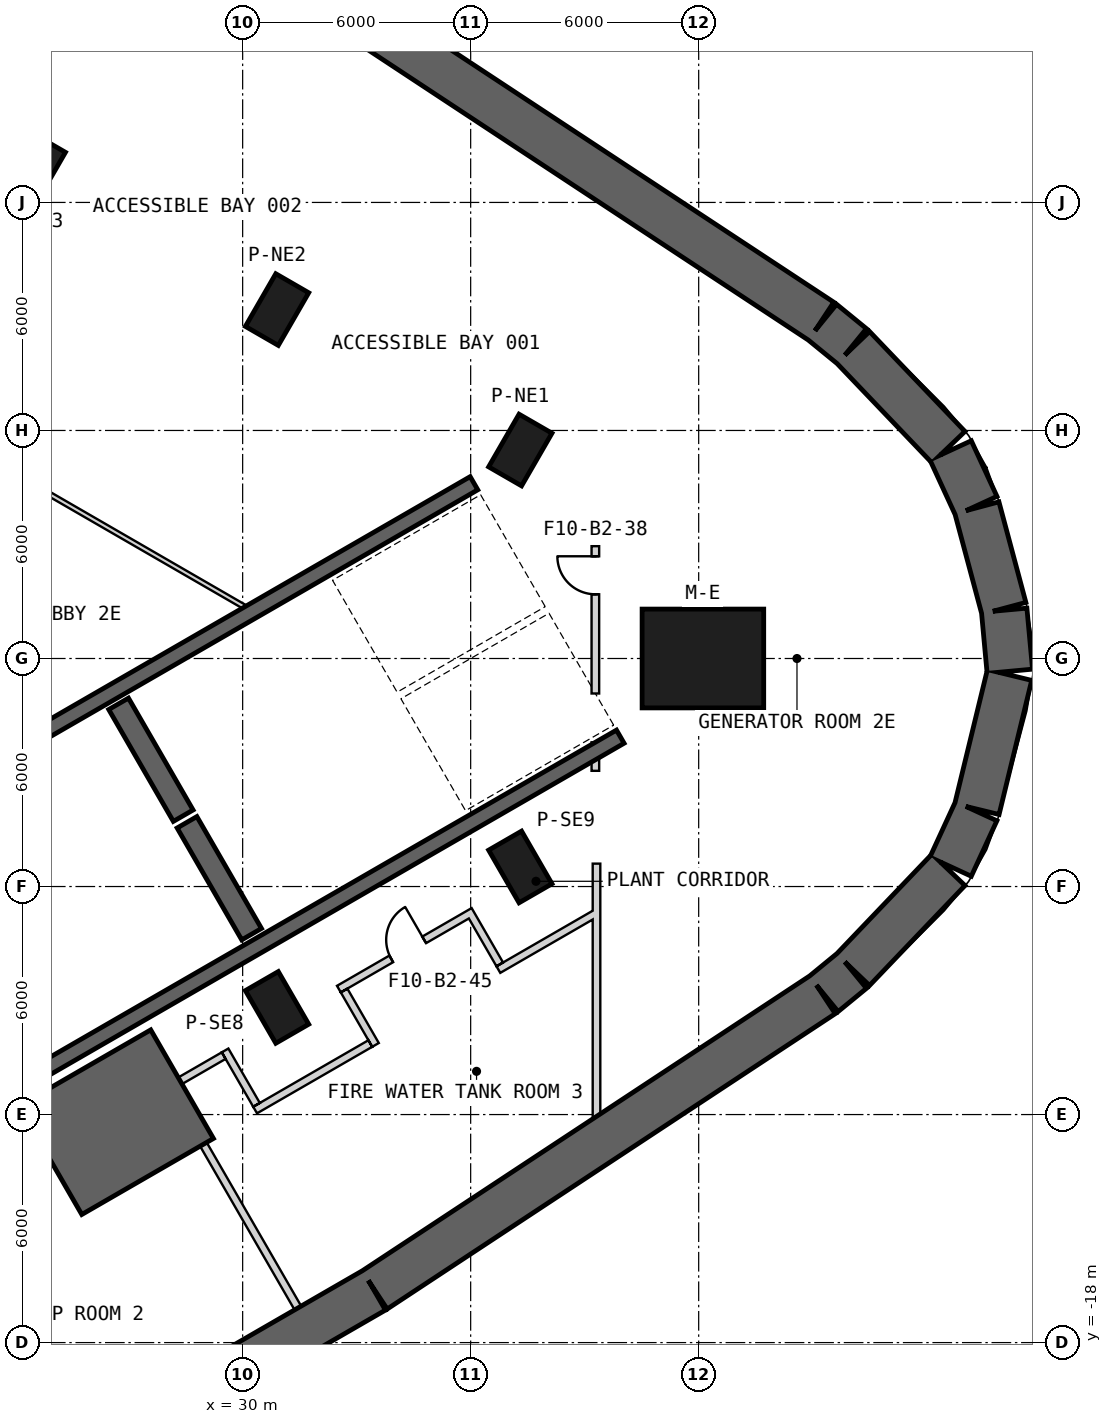
"""IFC4 building model, lengths in metres.
Left out: names, types, materials, properties, quantities, classifications, styles, units other than length and angle.
Written with IfcOpenShell. Run it as: python <this file> out.ifc"""

import sys

from ifc_helpers import new_model, si_unit, direction, frame, frame_2d, origin, origin_2d, place, context, subcontext, project, spatial, polyline, rectangle, outline, extrude, element, fill, save


model = new_model("IFC4")
c1 = context("Model", 3, precision=1e-05, world=origin(), true_north=direction((0.0, 1.0)))
c2 = subcontext(c1, "Body", "Model", "MODEL_VIEW")
j1 = project(units=[si_unit("LENGTHUNIT", "METRE"), si_unit("PLANEANGLEUNIT", "RADIAN")], contexts=[c1])
p1 = place(None, origin())
s1 = spatial("IfcSite", under=j1, at=p1, CompositionType="ELEMENT")
p2 = place(p1, origin())
s2 = spatial("IfcBuilding", under=s1, at=p2, CompositionType="ELEMENT")
p3 = place(p2, frame((0.0, 0.0, -11.0)))
s3 = spatial("IfcBuildingStorey", under=s2, at=p3, CompositionType="ELEMENT", Elevation=-11.0)
p4 = place(p3, frame((48.629, 5.478, -0.4), z_axis=(0.0, 0.0, 1.0), x_axis=(0.418818025447, -0.908070185372, 0.0)))
e1 = element("IfcWall", 1, at=p4, inside=s3, PredefinedType="SHEAR", context=c2, shape_type="SweptSolid", body=[
    extrude(rectangle(XDim=1.612, YDim=1.2, at=frame_2d((0.806, 0.0))), origin(), (0.0, 0.0, 1.0), 5.9),
])
p5 = place(p3, frame((49.321, 3.967, -0.4), z_axis=(0.0, 0.0, 1.0), x_axis=(0.258832579125, -0.965922199757, 0.0)))
e2 = element("IfcWall", 2, at=p5, inside=s3, PredefinedType="SHEAR", context=c2, shape_type="SweptSolid", body=[
    extrude(rectangle(XDim=2.74, YDim=1.2, at=frame_2d((1.37, 0.0))), origin(), (0.0, 0.0, 1.0), 5.9),
])
p6 = place(p3, frame((50.039, 1.27, -0.4), z_axis=(0.0, 0.0, 1.0), x_axis=(0.091914614293, -0.995766892239, 0.0)))
e3 = element("IfcWall", 3, at=p6, inside=s3, PredefinedType="SHEAR", context=c2, shape_type="SweptSolid", body=[
    extrude(rectangle(XDim=1.612, YDim=1.2, at=frame_2d((0.806, 0.0))), origin(), (0.0, 0.0, 1.0), 5.9),
])
p7 = place(p3, frame((50.18, -0.434, -0.4), z_axis=(0.0, 0.0, 1.0), x_axis=(-0.236488803439, -0.971634214017, 0.0)))
e4 = element("IfcWall", 4, at=p7, inside=s3, PredefinedType="SHEAR", context=c2, shape_type="SweptSolid", body=[
    extrude(rectangle(XDim=3.632, YDim=1.2, at=frame_2d((1.816, 0.0))), origin(), (0.0, 0.0, 1.0), 5.9),
])
p8 = place(p3, frame((49.302, -4.018, -0.4), z_axis=(0.0, 0.0, 1.0), x_axis=(-0.418875242685, -0.908043793584, 0.0)))
e5 = element("IfcWall", 5, at=p8, inside=s3, PredefinedType="SHEAR", context=c2, shape_type="SweptSolid", body=[
    extrude(rectangle(XDim=1.608, YDim=1.2, at=frame_2d((0.804, 0.0))), origin(), (0.0, 0.0, 1.0), 5.9),
])
p9 = place(p3, frame((48.573, -5.56, -0.4), z_axis=(0.0, 0.0, 1.0), x_axis=(-0.690605067942, -0.723232079026, 0.0)))
e6 = element("IfcWall", 6, at=p9, inside=s3, PredefinedType="SHEAR", context=c2, shape_type="SweptSolid", body=[
    extrude(rectangle(XDim=3.637, YDim=1.2, at=frame_2d((1.818, 0.0))), origin(), (0.0, 0.0, 1.0), 5.9),
])
p10 = place(p3, frame((46.035, -8.215, -0.4), z_axis=(0.0, 0.0, 1.0), x_axis=(-0.773381934872, -0.63394036219, 0.0)))
e7 = element("IfcWall", 7, at=p10, inside=s3, PredefinedType="SHEAR", context=c2, shape_type="SweptSolid", body=[
    extrude(rectangle(XDim=0.965, YDim=1.2, at=frame_2d((0.482, 0.0))), origin(), (0.0, 0.0, 1.0), 5.9),
])
p11 = place(p3, frame((45.264, -8.845, -0.4), z_axis=(0.0, 0.0, 1.0), x_axis=(-0.834961815433, -0.550307883615, 0.0)))
e8 = element("IfcWall", 8, at=p11, inside=s3, PredefinedType="SHEAR", context=c2, shape_type="SweptSolid", body=[
    extrude(rectangle(XDim=14.122, YDim=1.2, at=frame_2d((7.061, 0.0))), origin(), (0.0, 0.0, 1.0), 5.9),
])
p12 = place(p3, frame((33.458, -16.625, -0.4), z_axis=(0.0, 0.0, 1.0), x_axis=(-0.865989988988, -0.500061335211, 0.0)))
e9 = element("IfcWall", 9, at=p12, inside=s3, PredefinedType="SHEAR", context=c2, shape_type="SweptSolid", body=[
    extrude(rectangle(XDim=41.324, YDim=1.2, at=frame_2d((20.662, 0.0))), origin(), (0.0, 0.0, 1.0), 5.9),
])
p13 = place(p3, frame((33.474, 16.619, -0.4), z_axis=(0.0, 0.0, 1.0), x_axis=(0.834958385769, -0.550313087282, 0.0)))
e10 = element("IfcWall", 10, at=p13, inside=s3, PredefinedType="SHEAR", context=c2, shape_type="SweptSolid", body=[
    extrude(rectangle(XDim=14.074, YDim=1.2, at=frame_2d((7.037, 0.0))), origin(), (0.0, 0.0, 1.0), 5.9),
])
p14 = place(p3, frame((45.25, 8.856, -0.4), z_axis=(0.0, 0.0, 1.0), x_axis=(0.774750221958, -0.632267422517, 0.0)))
e11 = element("IfcWall", 11, at=p14, inside=s3, PredefinedType="SHEAR", context=c2, shape_type="SweptSolid", body=[
    extrude(rectangle(XDim=1.014, YDim=1.2, at=frame_2d((0.507, 0.0))), origin(), (0.0, 0.0, 1.0), 5.9),
])
p15 = place(p3, frame((46.062, 8.189, -0.4), z_axis=(0.0, 0.0, 1.0), x_axis=(0.690635437427, -0.723203078375, 0.0)))
e12 = element("IfcWall", 12, at=p15, inside=s3, PredefinedType="SHEAR", context=c2, shape_type="SweptSolid", body=[
    extrude(rectangle(XDim=3.636, YDim=1.2, at=frame_2d((1.818, 0.0))), origin(), (0.0, 0.0, 1.0), 5.9),
])
p16 = place(p3, frame((42.111, 0.0, -0.4), z_axis=(0.0, 0.0, 1.0), x_axis=(1.0, 0.0, 0.0)))
e13 = element("IfcColumn", 13, at=p16, inside=s3, PredefinedType="COLUMN", context=c2, shape_type="SweptSolid", body=[
    extrude(rectangle(XDim=3.2, YDim=2.6, at=origin_2d()), origin(), (0.0, 0.0, 1.0), 5.9),
])
for number, where, z_axis, x_axis in (
    (14, (37.306, 5.485, -0.4), (0.0, 0.0, 1.0), (0.5, 0.866, 0.0)),
    (15, (30.905, 9.181, -0.4), (0.0, 0.0, 1.0), (0.5, 0.866, 0.0)),
    (16, (24.504, 12.876, -0.4), (0.0, 0.0, 1.0), (0.5, 0.866, 0.0)),
    (17, (30.905, -9.181, -0.4), (0.0, 0.0, 1.0), (0.5, -0.866, 0.0)),
    (18, (37.306, -5.485, -0.4), (0.0, 0.0, 1.0), (0.5, -0.866, 0.0)),
):
    element("IfcColumn", number, at=place(p3, frame(where, z_axis=z_axis, x_axis=x_axis)), inside=s3, PredefinedType="COLUMN", context=c2, shape_type="SweptSolid", body=[
        extrude(rectangle(XDim=1.6, YDim=1.0, at=origin_2d()), origin(), (0.0, 0.0, 1.0), 5.9),
    ])
for number, where, z_axis, x_axis in (
    (19, (26.736, -1.192, -0.4), (0.0, 0.0, 1.0), (0.5, -0.866, 0.0)),
    (20, (28.536, -4.309, -0.4), (0.0, 0.0, 1.0), (0.5, -0.866, 0.0)),
):
    element("IfcWall", number, at=place(p3, frame(where, z_axis=z_axis, x_axis=x_axis)), inside=s3, PredefinedType="STANDARD", context=c2, shape_type="SweptSolid", body=[
        extrude(rectangle(XDim=3.4, YDim=0.6, at=frame_2d((1.7, 0.0))), origin(), (0.0, 0.0, 1.0), 1.307),
    ])
p17 = place(p3, frame((22.875, -11.908, -0.4), z_axis=(0.0, 0.0, 1.0), x_axis=(0.866022361258, 0.500005269773, 0.0)))
e21 = element("IfcWall", 21, at=p17, inside=s3, PredefinedType="SHEAR", context=c2, shape_type="SweptSolid", body=[
    extrude(rectangle(XDim=19.702, YDim=0.4, at=frame_2d((9.851, 0.0))), origin(), (0.0, 0.0, 1.0), 5.5),
])
p18 = place(p3, frame((36.087, 4.611, -0.4), z_axis=(0.0, 0.0, 1.0), x_axis=(-0.866024629043, -0.500001341888, 0.0)))
e22 = element("IfcWall", 22, at=p18, inside=s3, PredefinedType="SHEAR", context=c2, shape_type="SweptSolid", body=[
    extrude(rectangle(XDim=19.702, YDim=0.4, at=frame_2d((9.851, 0.0))), origin(), (0.0, 0.0, 1.0), 5.5),
])
p19 = place(p3, frame((0.0, 0.0, -0.4)))
e23 = element("IfcWall", 23, at=p19, inside=s3, PredefinedType="SHEAR", context=c2, shape_type="SweptSolid", body=[
    extrude(outline(polyline([(25.767, -14.63), (29.231, -12.63), (27.581, -9.772), (24.117, -11.772), (25.767, -14.63)])), origin(), (0.0, 0.0, 1.0), 5.9),
])
p20 = place(p3, frame((30.376, 1.169, 0.0), z_axis=(0.0, 0.0, 1.0), x_axis=(-0.865777000343, 0.500430000777, 0.0)))
e24 = element("IfcWall", 24, at=p20, inside=s3, PredefinedType="PARTITIONING", context=c2, shape_type="SweptSolid", body=[
    extrude(rectangle(XDim=39.978, YDim=0.12, at=frame_2d((19.989, 0.0))), origin(), (0.0, 0.0, 1.0), 4.18),
])
p21 = place(p20, frame((28.784, 0.0, 0.0)))
e25 = element("IfcOpeningElement", 25, at=p21, cuts=e24, PredefinedType="OPENING", context=c2, shape_type="SweptSolid", body=[
    extrude(rectangle(XDim=1.2, YDim=2.4, at=frame_2d((0.6, 1.2))), frame((0.0, 0.07, 0.0), z_axis=(0.0, -1.0, 0.0), x_axis=(1.0, 0.0, 0.0)), (0.0, 0.0, 1.0), 0.14),
])
p22 = place(p20, frame((9.984, 0.0, 0.0)))
e26 = element("IfcOpeningElement", 26, at=p22, cuts=e24, PredefinedType="OPENING", context=c2, shape_type="SweptSolid", body=[
    extrude(rectangle(XDim=1.2, YDim=2.4, at=frame_2d((0.6, 1.2))), frame((0.0, 0.07, 0.0), z_axis=(0.0, -1.0, 0.0), x_axis=(1.0, 0.0, 0.0)), (0.0, 0.0, 1.0), 0.14),
])
p23 = place(p3, frame((39.311, -6.697, 0.0), z_axis=(0.0, 0.0, 1.0), x_axis=(0.0, 1.0, 0.0)))
e27 = element("IfcWall", 27, at=p23, inside=s3, PredefinedType="PARTITIONING", context=c2, shape_type="SweptSolid", body=[
    extrude(rectangle(XDim=1.3, YDim=0.2, at=frame_2d((0.65, 0.0))), origin(), (0.0, 0.0, 1.0), 5.1),
])
p24 = place(p3, frame((39.281, -2.955, 0.0), z_axis=(0.0, 0.0, 1.0), x_axis=(0.0, 1.0, 0.0)))
e28 = element("IfcWall", 28, at=p24, inside=s3, PredefinedType="PARTITIONING", context=c2, shape_type="SweptSolid", body=[
    extrude(rectangle(XDim=0.75, YDim=0.2, at=frame_2d((0.375, 0.0))), origin(), (0.0, 0.0, 1.0), 5.1),
])
p25 = place(p3, frame((39.281, -0.921, 0.0), z_axis=(0.0, 0.0, 1.0), x_axis=(0.0, 1.0, 0.0)))
e29 = element("IfcWall", 29, at=p25, inside=s3, PredefinedType="PARTITIONING", context=c2, shape_type="SweptSolid", body=[
    extrude(rectangle(XDim=3.876, YDim=0.2, at=frame_2d((1.938, 0.0))), origin(), (0.0, 0.0, 1.0), 5.1),
])
p26 = place(p25, frame((2.61, 0.0, 0.0)))
e30 = element("IfcOpeningElement", 30, at=p26, cuts=e29, PredefinedType="OPENING", context=c2, shape_type="SweptSolid", body=[
    extrude(rectangle(XDim=1.0, YDim=2.1, at=frame_2d((0.5, 1.05))), frame((0.0, 0.11, 0.0), z_axis=(0.0, -1.0, 0.0), x_axis=(1.0, 0.0, 0.0)), (0.0, 0.0, 1.0), 0.22),
])
p27 = place(p3, frame((39.311, -6.697, 0.0), z_axis=(0.0, 0.0, 1.0), x_axis=(0.0, -1.0, 0.0)))
e31 = element("IfcWall", 31, at=p27, inside=s3, PredefinedType="PARTITIONING", context=c2, shape_type="SweptSolid", body=[
    extrude(rectangle(XDim=5.388, YDim=0.2, at=frame_2d((2.694, 0.0))), origin(), (0.0, 0.0, 1.0), 5.1),
])
p28 = place(p3, frame((28.354, -11.111, 0.0), z_axis=(0.0, 0.0, 1.0), x_axis=(0.866056658381, 0.499945861543, 0.0)))
e32 = element("IfcWall", 32, at=p28, inside=s3, PredefinedType="PARTITIONING", context=c2, shape_type="SweptSolid", body=[
    extrude(rectangle(XDim=1.324, YDim=0.2, at=frame_2d((0.662, 0.0))), origin(), (0.0, 0.0, 1.0), 5.1),
])
p29 = place(p3, frame((32.532, -8.699, 0.0), z_axis=(0.0, 0.0, 1.0), x_axis=(0.866018425233, 0.500012087011, 0.0)))
e33 = element("IfcWall", 33, at=p29, inside=s3, PredefinedType="PARTITIONING", context=c2, shape_type="SweptSolid", body=[
    extrude(rectangle(XDim=3.892, YDim=0.2, at=frame_2d((1.946, 0.0))), origin(), (0.0, 0.0, 1.0), 5.1),
])
p30 = place(p29, frame((1.591, 0.0, 0.0)))
e34 = element("IfcOpeningElement", 34, at=p30, cuts=e33, PredefinedType="OPENING", context=c2, shape_type="SweptSolid", body=[
    extrude(rectangle(XDim=1.0, YDim=2.1, at=frame_2d((0.5, 1.05))), frame((0.0, 0.11, 0.0), z_axis=(0.0, -1.0, 0.0), x_axis=(1.0, 0.0, 0.0)), (0.0, 0.0, 1.0), 0.22),
])
p31 = place(p3, frame((30.328, -11.881, 0.0), z_axis=(0.0, 0.0, 1.0), x_axis=(0.866019471182, 0.500010275428, 0.0)))
e35 = element("IfcWall", 35, at=p31, inside=s3, PredefinedType="PARTITIONING", context=c2, shape_type="SweptSolid", body=[
    extrude(rectangle(XDim=3.5, YDim=0.2, at=frame_2d((1.75, 0.0))), origin(), (0.0, 0.0, 1.0), 5.1),
])
p32 = place(p3, frame((36.729, -8.186, 0.0), z_axis=(0.0, 0.0, 1.0), x_axis=(0.865999269783, 0.500045262687, 0.0)))
e36 = element("IfcWall", 36, at=p32, inside=s3, PredefinedType="PARTITIONING", context=c2, shape_type="SweptSolid", body=[
    extrude(rectangle(XDim=3.011, YDim=0.2, at=frame_2d((1.506, 0.0))), origin(), (0.0, 0.0, 1.0), 5.1),
])
for number, where, z_axis, x_axis in (
    (37, (36.766, -8.049, 0.0), (0.0, 0.0, 1.0), (-0.5, 0.866, 0.0)),
    (38, (33.496, -10.168, 0.0), (0.0, 0.0, 1.0), (-0.5, 0.866, 0.0)),
):
    element("IfcWall", number, at=place(p3, frame(where, z_axis=z_axis, x_axis=x_axis)), inside=s3, PredefinedType="PARTITIONING", context=c2, shape_type="SweptSolid", body=[
        extrude(rectangle(XDim=1.653, YDim=0.2, at=frame_2d((0.827, 0.0))), origin(), (0.0, 0.0, 1.0), 5.1),
    ])
p33 = place(p3, frame((30.365, -11.745, 0.0), z_axis=(0.0, 0.0, 1.0), x_axis=(-0.499918423778, 0.866072496716, 0.0)))
e39 = element("IfcWall", 39, at=p33, inside=s3, PredefinedType="PARTITIONING", context=c2, shape_type="SweptSolid", body=[
    extrude(rectangle(XDim=1.654, YDim=0.2, at=frame_2d((0.827, 0.0))), origin(), (0.0, 0.0, 1.0), 5.1),
])
p34 = place(p3, frame((31.454, -17.09, 0.0), z_axis=(0.0, 0.0, 1.0), x_axis=(-0.49999297576, 0.866029459193, 0.0)))
e40 = element("IfcWall", 40, at=p34, inside=s3, PredefinedType="PARTITIONING", context=c2, shape_type="SweptSolid", body=[
    extrude(rectangle(XDim=4.974, YDim=0.2, at=frame_2d((2.487, 0.0))), origin(), (0.0, 0.0, 1.0), 5.1),
])
p35 = place(p26, origin())
e41 = element("IfcDoor", 41, at=p35, inside=s3, OperationType="SINGLE_SWING_RIGHT", PredefinedType="USERDEFINED", context=c2, shape_type="SweptSolid", body=[
    extrude(rectangle(XDim=1.0, YDim=2.1, at=frame_2d((0.5, 1.05))), frame((0.0, 0.025, 0.0), z_axis=(0.0, -1.0, 0.0), x_axis=(1.0, 0.0, 0.0)), (0.0, 0.0, 1.0), 0.05),
])
fill(e30, e41)
p36 = place(p30, origin())
e42 = element("IfcDoor", 42, at=p36, inside=s3, OperationType="SINGLE_SWING_RIGHT", PredefinedType="USERDEFINED", context=c2, shape_type="SweptSolid", body=[
    extrude(rectangle(XDim=1.0, YDim=2.1, at=frame_2d((0.5, 1.05))), frame((0.0, 0.025, 0.0), z_axis=(0.0, -1.0, 0.0), x_axis=(1.0, 0.0, 0.0)), (0.0, 0.0, 1.0), 0.05),
])
fill(e34, e42)
save(model, sys.argv[1])
